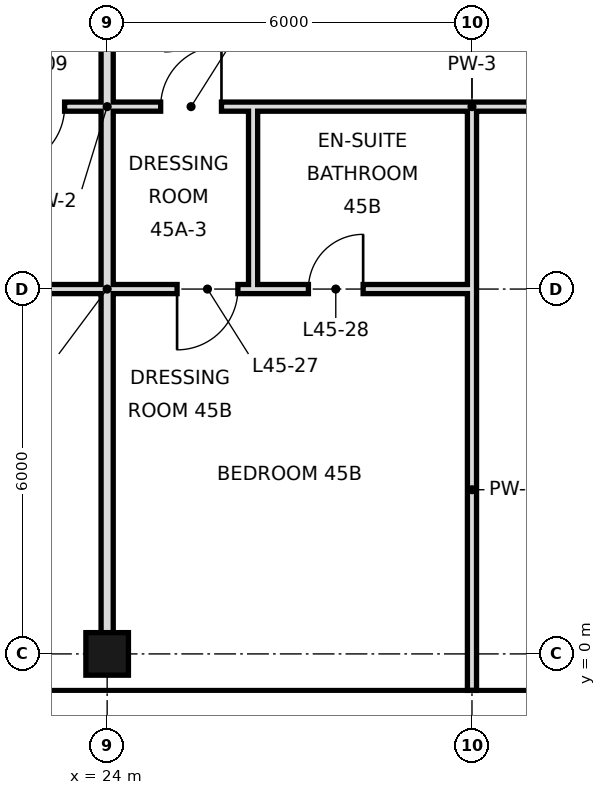
"""IFC4 building model, lengths in metres.
Left out: names, types, materials, properties, quantities, classifications, styles, units other than length and angle.
Written with IfcOpenShell. Run it as: python <this file> out.ifc"""

import sys

from ifc_helpers import new_model, si_unit, direction, frame, frame_2d, origin, origin_2d, place, context, subcontext, project, spatial, rectangle, hollow_rectangle, extrude, element, fill, save


model = new_model("IFC4")
c1 = context("Model", 3, precision=1e-05, world=origin(), true_north=direction((0.0, 1.0)))
c2 = subcontext(c1, "Body", "Model", "MODEL_VIEW")
j1 = project(units=[si_unit("LENGTHUNIT", "METRE"), si_unit("PLANEANGLEUNIT", "RADIAN")], contexts=[c1])
p1 = place(None, origin())
s1 = spatial("IfcSite", under=j1, at=p1, CompositionType="ELEMENT")
p2 = place(p1, origin())
s2 = spatial("IfcBuilding", under=s1, at=p2, CompositionType="ELEMENT")
p3 = place(p2, frame((0.0, 0.0, 195.6)))
s3 = spatial("IfcBuildingStorey", under=s2, at=p3, CompositionType="ELEMENT", Elevation=195.6)
p4 = place(p3, frame((24.0, 0.0, 0.0), z_axis=(0.0, 0.0, 1.0), x_axis=(1.0, 0.0, 0.0)))
e1 = element("IfcColumn", 1, at=p4, inside=s3, PredefinedType="COLUMN", context=c2, shape_type="SweptSolid", body=[
    extrude(hollow_rectangle(XDim=0.7, YDim=0.7, WallThickness=0.036, at=origin_2d()), origin(), (0.0, 0.0, 1.0), 3.6),
])
p5 = place(p3, frame((24.0, 0.0, 0.0), z_axis=(0.0, 0.0, 1.0), x_axis=(0.0, 1.0, 0.0)))
e2 = element("IfcWall", 2, at=p5, inside=s3, PredefinedType="SOLIDWALL", context=c2, shape_type="SweptSolid", body=[
    extrude(rectangle(XDim=15.3, YDim=0.2, at=frame_2d((7.65, 0.0))), origin(), (0.0, 0.0, 1.0), 2.72),
])
p6 = place(p3, frame((26.4, 6.0, 0.0), z_axis=(0.0, 0.0, 1.0), x_axis=(0.0, 1.0, 0.0)))
e3 = element("IfcWall", 3, at=p6, inside=s3, PredefinedType="PARTITIONING", context=c2, shape_type="SweptSolid", body=[
    extrude(rectangle(XDim=3.0, YDim=0.15, at=frame_2d((1.5, 0.0))), origin(), (0.0, 0.0, 1.0), 3.42),
])
p7 = place(p3, frame((30.0, -0.6, 0.0), z_axis=(0.0, 0.0, 1.0), x_axis=(0.0, 1.0, 0.0)))
e4 = element("IfcWall", 4, at=p7, inside=s3, PredefinedType="PARTITIONING", context=c2, shape_type="SweptSolid", body=[
    extrude(rectangle(XDim=6.6, YDim=0.15, at=frame_2d((3.3, 0.0))), origin(), (0.0, 0.0, 1.0), 2.72),
])
p8 = place(p3, frame((30.0, 6.0, 0.0), z_axis=(0.0, 0.0, 1.0), x_axis=(0.0, 1.0, 0.0)))
e5 = element("IfcWall", 5, at=p8, inside=s3, PredefinedType="PARTITIONING", context=c2, shape_type="SweptSolid", body=[
    extrude(rectangle(XDim=3.0, YDim=0.15, at=frame_2d((1.5, 0.0))), origin(), (0.0, 0.0, 1.0), 2.72),
])
p9 = place(p3, frame((21.6, 6.0, 0.0), z_axis=(0.0, 0.0, 1.0), x_axis=(1.0, 0.0, 0.0)))
e6 = element("IfcWall", 6, at=p9, inside=s3, PredefinedType="PARTITIONING", context=c2, shape_type="SweptSolid", body=[
    extrude(rectangle(XDim=4.8, YDim=0.15, at=frame_2d((2.4, 0.0))), origin(), (0.0, 0.0, 1.0), 2.97),
])
p10 = place(p9, frame((0.25, 0.0, 0.0)))
e7 = element("IfcOpeningElement", 7, at=p10, cuts=e6, PredefinedType="OPENING", context=c2, shape_type="SweptSolid", body=[
    extrude(rectangle(XDim=1.0, YDim=2.4, at=frame_2d((0.5, 1.2))), frame((0.0, 0.085, 0.0), z_axis=(0.0, -1.0, 0.0), x_axis=(1.0, 0.0, 0.0)), (0.0, 0.0, 1.0), 0.17),
])
p11 = place(p9, frame((3.55, 0.0, 0.0)))
e8 = element("IfcOpeningElement", 8, at=p11, cuts=e6, PredefinedType="OPENING", context=c2, shape_type="SweptSolid", body=[
    extrude(rectangle(XDim=1.0, YDim=2.4, at=frame_2d((0.5, 1.2))), frame((0.0, 0.085, 0.0), z_axis=(0.0, -1.0, 0.0), x_axis=(1.0, 0.0, 0.0)), (0.0, 0.0, 1.0), 0.17),
])
p12 = place(p3, frame((26.4, 6.0, 0.0), z_axis=(0.0, 0.0, 1.0), x_axis=(1.0, 0.0, 0.0)))
e9 = element("IfcWall", 9, at=p12, inside=s3, PredefinedType="PARTITIONING", context=c2, shape_type="SweptSolid", body=[
    extrude(rectangle(XDim=3.6, YDim=0.15, at=frame_2d((1.8, 0.0))), origin(), (0.0, 0.0, 1.0), 2.97),
])
p13 = place(p12, frame((0.91, 0.0, 0.0)))
e10 = element("IfcOpeningElement", 10, at=p13, cuts=e9, PredefinedType="OPENING", context=c2, shape_type="SweptSolid", body=[
    extrude(rectangle(XDim=0.9, YDim=2.4, at=frame_2d((0.45, 1.2))), frame((0.0, 0.085, 0.0), z_axis=(0.0, -1.0, 0.0), x_axis=(1.0, 0.0, 0.0)), (0.0, 0.0, 1.0), 0.17),
])
p14 = place(p3, frame((21.6, 9.0, 0.0), z_axis=(0.0, 0.0, 1.0), x_axis=(1.0, 0.0, 0.0)))
e11 = element("IfcWall", 11, at=p14, inside=s3, PredefinedType="PARTITIONING", context=c2, shape_type="SweptSolid", body=[
    extrude(rectangle(XDim=4.8, YDim=0.15, at=frame_2d((2.4, 0.0))), origin(), (0.0, 0.0, 1.0), 3.42),
])
p15 = place(p14, frame((0.7, 0.0, 0.0)))
e12 = element("IfcOpeningElement", 12, at=p15, cuts=e11, PredefinedType="OPENING", context=c2, shape_type="SweptSolid", body=[
    extrude(rectangle(XDim=1.0, YDim=2.4, at=frame_2d((0.5, 1.2))), frame((0.0, 0.085, 0.0), z_axis=(0.0, -1.0, 0.0), x_axis=(1.0, 0.0, 0.0)), (0.0, 0.0, 1.0), 0.17),
])
p16 = place(p14, frame((3.28, 0.0, 0.0)))
e13 = element("IfcOpeningElement", 13, at=p16, cuts=e11, PredefinedType="OPENING", context=c2, shape_type="SweptSolid", body=[
    extrude(rectangle(XDim=1.0, YDim=2.4, at=frame_2d((0.5, 1.2))), frame((0.0, 0.085, 0.0), z_axis=(0.0, -1.0, 0.0), x_axis=(1.0, 0.0, 0.0)), (0.0, 0.0, 1.0), 0.17),
])
p17 = place(p3, frame((30.0, 9.0, 0.0), z_axis=(0.0, 0.0, 1.0), x_axis=(1.0, 0.0, 0.0)))
e14 = element("IfcWall", 14, at=p17, inside=s3, PredefinedType="PARTITIONING", context=c2, shape_type="SweptSolid", body=[
    extrude(rectangle(XDim=6.0, YDim=0.15, at=frame_2d((3.0, 0.0))), origin(), (0.0, 0.0, 1.0), 3.42),
])
p18 = place(p17, frame((1.36, 0.0, 0.0)))
e15 = element("IfcOpeningElement", 15, at=p18, cuts=e14, PredefinedType="OPENING", context=c2, shape_type="SweptSolid", body=[
    extrude(rectangle(XDim=1.8, YDim=2.4, at=frame_2d((0.9, 1.2))), frame((0.0, 0.085, 0.0), z_axis=(0.0, -1.0, 0.0), x_axis=(1.0, 0.0, 0.0)), (0.0, 0.0, 1.0), 0.17),
])
p19 = place(p3, frame((26.4, 9.0, 0.0), z_axis=(0.0, 0.0, 1.0), x_axis=(1.0, 0.0, 0.0)))
e16 = element("IfcWall", 16, at=p19, inside=s3, PredefinedType="PARTITIONING", context=c2, shape_type="SweptSolid", body=[
    extrude(rectangle(XDim=3.6, YDim=0.15, at=frame_2d((1.8, 0.0))), origin(), (0.0, 0.0, 1.0), 3.42),
])
p20 = place(p15, frame((1.0, 0.0, 0.0), z_axis=(0.0, 0.0, 1.0), x_axis=(-1.0, 0.0, 0.0)))
e17 = element("IfcDoor", 17, at=p20, inside=s3, OperationType="SINGLE_SWING_RIGHT", PredefinedType="DOOR", context=c2, shape_type="SweptSolid", body=[
    extrude(rectangle(XDim=1.0, YDim=2.4, at=frame_2d((0.5, 1.2))), frame((0.0, 0.025, 0.0), z_axis=(0.0, -1.0, 0.0), x_axis=(1.0, 0.0, 0.0)), (0.0, 0.0, 1.0), 0.05),
])
fill(e12, e17)
p21 = place(p16, frame((1.0, 0.0, 0.0), z_axis=(0.0, 0.0, 1.0), x_axis=(-1.0, 0.0, 0.0)))
e18 = element("IfcDoor", 18, at=p21, inside=s3, OperationType="SINGLE_SWING_LEFT", PredefinedType="DOOR", context=c2, shape_type="SweptSolid", body=[
    extrude(rectangle(XDim=1.0, YDim=2.4, at=frame_2d((0.5, 1.2))), frame((0.0, 0.025, 0.0), z_axis=(0.0, -1.0, 0.0), x_axis=(1.0, 0.0, 0.0)), (0.0, 0.0, 1.0), 0.05),
])
fill(e13, e18)
p22 = place(p11, frame((1.0, 0.0, 0.0), z_axis=(0.0, 0.0, 1.0), x_axis=(-1.0, 0.0, 0.0)))
e19 = element("IfcDoor", 19, at=p22, inside=s3, OperationType="SINGLE_SWING_RIGHT", PredefinedType="DOOR", context=c2, shape_type="SweptSolid", body=[
    extrude(rectangle(XDim=1.0, YDim=2.4, at=frame_2d((0.5, 1.2))), frame((0.0, 0.025, 0.0), z_axis=(0.0, -1.0, 0.0), x_axis=(1.0, 0.0, 0.0)), (0.0, 0.0, 1.0), 0.05),
])
fill(e8, e19)
p23 = place(p13, frame((0.9, 0.0, 0.0), z_axis=(0.0, 0.0, 1.0), x_axis=(-1.0, 0.0, 0.0)))
e20 = element("IfcDoor", 20, at=p23, inside=s3, OperationType="SINGLE_SWING_LEFT", PredefinedType="DOOR", context=c2, shape_type="SweptSolid", body=[
    extrude(rectangle(XDim=0.9, YDim=2.4, at=frame_2d((0.45, 1.2))), frame((0.0, 0.025, 0.0), z_axis=(0.0, -1.0, 0.0), x_axis=(1.0, 0.0, 0.0)), (0.0, 0.0, 1.0), 0.05),
])
fill(e10, e20)
save(model, sys.argv[1])
